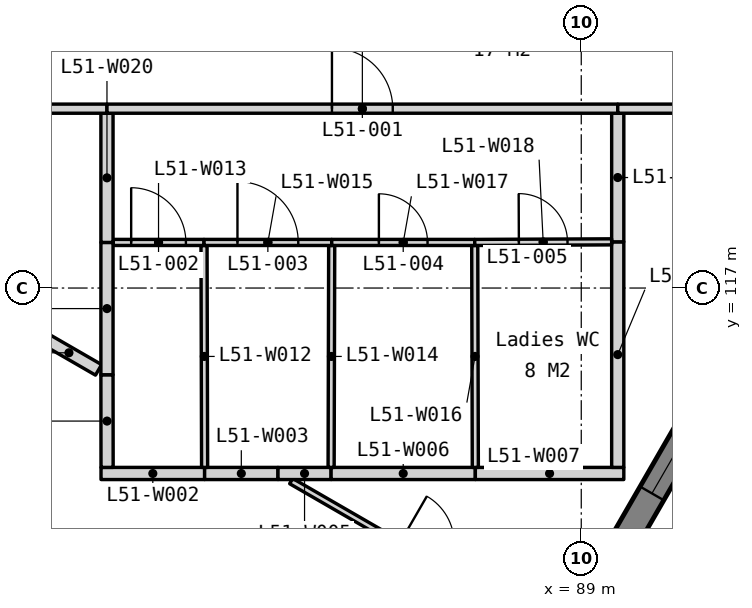
"""IFC4 building model, lengths in metres.
Left out: names, types, materials, properties, quantities, classifications, styles, units other than length and angle.
Written with IfcOpenShell. Run it as: python <this file> out.ifc"""

import sys

from ifc_helpers import new_model, si_unit, direction, frame, frame_2d, origin, place, context, subcontext, project, spatial, polyline, rectangle, outline, extrude, element, fill, save


model = new_model("IFC4")
c1 = context("Model", 3, precision=1e-05, world=origin(), true_north=direction((0.0, 1.0)))
c2 = subcontext(c1, "Body", "Model", "MODEL_VIEW")
j1 = project(units=[si_unit("LENGTHUNIT", "METRE"), si_unit("PLANEANGLEUNIT", "RADIAN")], contexts=[c1])
p1 = place(None, origin())
s1 = spatial("IfcSite", under=j1, at=p1, CompositionType="ELEMENT")
p2 = place(p1, origin())
s2 = spatial("IfcBuilding", under=s1, at=p2, CompositionType="ELEMENT")
p3 = place(p2, frame((0.0, 0.0, 203.6)))
s3 = spatial("IfcBuildingStorey", under=s2, at=p3, CompositionType="ELEMENT", Elevation=203.6)
p4 = place(p3, frame((81.505, 98.627, -0.15), z_axis=(0.0, 0.0, 1.0), x_axis=(0.500002199942, 0.866024133644, 0.0)))
e1 = element("IfcWall", 1, at=p4, inside=s3, PredefinedType="SOLIDWALL", context=c2, shape_type="SweptSolid", body=[
    extrude(outline(polyline([(38.729, 0.0), (38.729, 3.9), (0.0, 3.9), (0.0, 0.0), (38.729, 0.0)])), frame((0.0, 0.225, 0.0), z_axis=(0.0, -1.0, 0.0), x_axis=(1.0, 0.0, 0.0)), (0.0, 0.0, 1.0), 0.45),
])
p5 = place(p4, frame((0.807, 0.0, 0.95)))
e2 = element("IfcOpeningElement", 2, at=p5, cuts=e1, PredefinedType="OPENING", context=c2, shape_type="SweptSolid", body=[
    extrude(rectangle(XDim=1.2, YDim=2.2, at=frame_2d((0.6, 1.1))), frame((0.0, 0.235, 0.0), z_axis=(0.0, -1.0, 0.0), x_axis=(1.0, 0.0, 0.0)), (0.0, 0.0, 1.0), 0.47),
])
p6 = place(p4, frame((7.632, 0.0, 0.95)))
e3 = element("IfcOpeningElement", 3, at=p6, cuts=e1, PredefinedType="OPENING", context=c2, shape_type="SweptSolid", body=[
    extrude(rectangle(XDim=1.8, YDim=2.2, at=frame_2d((0.9, 1.1))), frame((0.0, 0.235, 0.0), z_axis=(0.0, -1.0, 0.0), x_axis=(1.0, 0.0, 0.0)), (0.0, 0.0, 1.0), 0.47),
])
p7 = place(p4, frame((9.932, 0.0, 0.95)))
e4 = element("IfcOpeningElement", 4, at=p7, cuts=e1, PredefinedType="OPENING", context=c2, shape_type="SweptSolid", body=[
    extrude(rectangle(XDim=1.8, YDim=2.2, at=frame_2d((0.9, 1.1))), frame((0.0, 0.235, 0.0), z_axis=(0.0, -1.0, 0.0), x_axis=(1.0, 0.0, 0.0)), (0.0, 0.0, 1.0), 0.47),
])
p8 = place(p4, frame((17.315, 0.0, 0.95)))
e5 = element("IfcOpeningElement", 5, at=p8, cuts=e1, PredefinedType="OPENING", context=c2, shape_type="SweptSolid", body=[
    extrude(rectangle(XDim=1.8, YDim=2.2, at=frame_2d((0.9, 1.1))), frame((0.0, 0.235, 0.0), z_axis=(0.0, -1.0, 0.0), x_axis=(1.0, 0.0, 0.0)), (0.0, 0.0, 1.0), 0.47),
])
p9 = place(p4, frame((19.615, 0.0, 0.95)))
e6 = element("IfcOpeningElement", 6, at=p9, cuts=e1, PredefinedType="OPENING", context=c2, shape_type="SweptSolid", body=[
    extrude(rectangle(XDim=1.8, YDim=2.2, at=frame_2d((0.9, 1.1))), frame((0.0, 0.235, 0.0), z_axis=(0.0, -1.0, 0.0), x_axis=(1.0, 0.0, 0.0)), (0.0, 0.0, 1.0), 0.47),
])
p10 = place(p4, frame((26.997, 0.0, 0.95)))
e7 = element("IfcOpeningElement", 7, at=p10, cuts=e1, PredefinedType="OPENING", context=c2, shape_type="SweptSolid", body=[
    extrude(rectangle(XDim=1.8, YDim=2.2, at=frame_2d((0.9, 1.1))), frame((0.0, 0.235, 0.0), z_axis=(0.0, -1.0, 0.0), x_axis=(1.0, 0.0, 0.0)), (0.0, 0.0, 1.0), 0.47),
])
p11 = place(p4, frame((29.297, 0.0, 0.95)))
e8 = element("IfcOpeningElement", 8, at=p11, cuts=e1, PredefinedType="OPENING", context=c2, shape_type="SweptSolid", body=[
    extrude(rectangle(XDim=1.8, YDim=2.2, at=frame_2d((0.9, 1.1))), frame((0.0, 0.235, 0.0), z_axis=(0.0, -1.0, 0.0), x_axis=(1.0, 0.0, 0.0)), (0.0, 0.0, 1.0), 0.47),
])
p12 = place(p4, frame((36.722, 0.0, 0.95)))
e9 = element("IfcOpeningElement", 9, at=p12, cuts=e1, PredefinedType="OPENING", context=c2, shape_type="SweptSolid", body=[
    extrude(rectangle(XDim=1.2, YDim=2.2, at=frame_2d((0.6, 1.1))), frame((0.0, 0.235, 0.0), z_axis=(0.0, -1.0, 0.0), x_axis=(1.0, 0.0, 0.0)), (0.0, 0.0, 1.0), 0.47),
])
p13 = place(p3, frame((81.102, 113.95, 0.0), z_axis=(0.0, 0.0, 1.0), x_axis=(1.0, 0.0, 0.0)))
e10 = element("IfcWall", 10, at=p13, inside=s3, PredefinedType="PARTITIONING", context=c2, shape_type="SweptSolid", body=[
    extrude(rectangle(XDim=1.704, YDim=0.2, at=frame_2d((0.852, 0.0))), origin(), (0.0, 0.0, 1.0), 3.75),
])
p14 = place(p3, frame((82.806, 113.95, 0.0), z_axis=(0.0, 0.0, 1.0), x_axis=(1.0, 0.0, 0.0)))
e11 = element("IfcWall", 11, at=p14, inside=s3, PredefinedType="PARTITIONING", context=c2, shape_type="SweptSolid", body=[
    extrude(rectangle(XDim=1.207, YDim=0.2, at=frame_2d((0.604, 0.0))), origin(), (0.0, 0.0, 1.0), 3.75),
])
p15 = place(p3, frame((84.229, 113.825, 0.0), z_axis=(0.0, 0.0, 1.0), x_axis=(0.866023434512, -0.500003410864, 0.0)))
e12 = element("IfcWall", 12, at=p15, inside=s3, PredefinedType="PARTITIONING", context=c2, shape_type="SweptSolid", body=[
    extrude(rectangle(XDim=5.015, YDim=0.1, at=frame_2d((2.507, 0.0))), origin(), (0.0, 0.0, 1.0), 3.75),
])
p16 = place(p15, frame((2.057, 0.0, 0.0)))
e13 = element("IfcOpeningElement", 13, at=p16, cuts=e12, PredefinedType="OPENING", context=c2, shape_type="SweptSolid", body=[
    extrude(rectangle(XDim=0.9, YDim=2.1, at=frame_2d((0.45, 1.05))), frame((0.0, 0.06, 0.0), z_axis=(0.0, -1.0, 0.0), x_axis=(1.0, 0.0, 0.0)), (0.0, 0.0, 1.0), 0.12),
])
p17 = place(p3, frame((84.013, 113.95, 0.0), z_axis=(0.0, 0.0, 1.0), x_axis=(1.0, 0.0, 0.0)))
e14 = element("IfcWall", 14, at=p17, inside=s3, PredefinedType="PARTITIONING", context=c2, shape_type="SweptSolid", body=[
    extrude(rectangle(XDim=0.873, YDim=0.2, at=frame_2d((0.437, 0.0))), origin(), (0.0, 0.0, 1.0), 3.75),
])
p18 = place(p3, frame((84.886, 113.95, 0.0), z_axis=(0.0, 0.0, 1.0), x_axis=(1.0, 0.0, 0.0)))
e15 = element("IfcWall", 15, at=p18, inside=s3, PredefinedType="PARTITIONING", context=c2, shape_type="SweptSolid", body=[
    extrude(rectangle(XDim=2.372, YDim=0.2, at=frame_2d((1.186, 0.0))), origin(), (0.0, 0.0, 1.0), 3.75),
])
p19 = place(p3, frame((87.258, 113.95, 0.0), z_axis=(0.0, 0.0, 1.0), x_axis=(1.0, 0.0, 0.0)))
e16 = element("IfcWall", 16, at=p19, inside=s3, PredefinedType="PARTITIONING", context=c2, shape_type="SweptSolid", body=[
    extrude(rectangle(XDim=2.442, YDim=0.2, at=frame_2d((1.221, 0.0))), origin(), (0.0, 0.0, 1.0), 3.75),
])
p20 = place(p3, frame((89.6, 114.05, 0.0), z_axis=(0.0, 0.0, 1.0), x_axis=(0.0, 1.0, 0.0)))
e17 = element("IfcWall", 17, at=p20, inside=s3, PredefinedType="PARTITIONING", context=c2, shape_type="SweptSolid", body=[
    extrude(rectangle(XDim=3.71, YDim=0.2, at=frame_2d((1.855, 0.0))), origin(), (0.0, 0.0, 1.0), 3.75),
])
p21 = place(p3, frame((81.202, 114.05, 0.0), z_axis=(0.0, 0.0, 1.0), x_axis=(-0.001281639447, 0.9999991787, 0.0)))
e18 = element("IfcWall", 18, at=p21, inside=s3, PredefinedType="PARTITIONING", context=c2, shape_type="SweptSolid", body=[
    extrude(rectangle(XDim=1.524, YDim=0.2, at=frame_2d((0.762, 0.0))), origin(), (0.0, 0.0, 1.0), 3.75),
])
p22 = place(p3, frame((80.088, 116.216, 0.0), z_axis=(0.0, 0.0, 1.0), x_axis=(0.866030125237, -0.499991822116, 0.0)))
e19 = element("IfcWall", 19, at=p22, inside=s3, PredefinedType="PARTITIONING", context=c2, shape_type="SweptSolid", body=[
    extrude(rectangle(XDim=1.125, YDim=0.2, at=frame_2d((0.562, 0.0))), origin(), (0.0, 0.0, 1.0), 3.75),
])
p23 = place(p3, frame((89.6, 117.76, 0.0), z_axis=(0.0, 0.0, 1.0), x_axis=(0.0, 1.0, 0.0)))
e20 = element("IfcWall", 20, at=p23, inside=s3, PredefinedType="PARTITIONING", context=c2, shape_type="SweptSolid", body=[
    extrude(rectangle(XDim=2.115, YDim=0.2, at=frame_2d((1.058, 0.0))), origin(), (0.0, 0.0, 1.0), 3.75),
])
p24 = place(p3, frame((82.806, 114.05, 0.0), z_axis=(0.0, 0.0, 1.0), x_axis=(-0.002608686776, 0.999996597371, 0.0)))
e21 = element("IfcWall", 21, at=p24, inside=s3, PredefinedType="PARTITIONING", context=c2, shape_type="SweptSolid", body=[
    extrude(rectangle(XDim=3.65, YDim=0.1, at=frame_2d((1.825, 0.0))), origin(), (0.0, 0.0, 1.0), 3.75),
])
p25 = place(p3, frame((81.3, 117.75, 0.0), z_axis=(0.0, 0.0, 1.0), x_axis=(1.0, 0.0, 0.0)))
e22 = element("IfcWall", 22, at=p25, inside=s3, PredefinedType="PARTITIONING", context=c2, shape_type="SweptSolid", body=[
    extrude(rectangle(XDim=1.496, YDim=0.1, at=frame_2d((0.748, 0.0))), origin(), (0.0, 0.0, 1.0), 3.75),
])
p26 = place(p25, frame((0.298, 0.0, 0.0)))
e23 = element("IfcOpeningElement", 23, at=p26, cuts=e22, PredefinedType="OPENING", context=c2, shape_type="SweptSolid", body=[
    extrude(rectangle(XDim=0.9, YDim=2.1, at=frame_2d((0.45, 1.05))), frame((0.0, 0.06, 0.0), z_axis=(0.0, -1.0, 0.0), x_axis=(1.0, 0.0, 0.0)), (0.0, 0.0, 1.0), 0.12),
])
p27 = place(p3, frame((84.886, 114.05, 0.0), z_axis=(0.0, 0.0, 1.0), x_axis=(0.002608686776, 0.999996597371, 0.0)))
e24 = element("IfcWall", 24, at=p27, inside=s3, PredefinedType="PARTITIONING", context=c2, shape_type="SweptSolid", body=[
    extrude(rectangle(XDim=3.65, YDim=0.1, at=frame_2d((1.825, 0.0))), origin(), (0.0, 0.0, 1.0), 3.75),
])
p28 = place(p3, frame((82.796, 117.75, 0.0), z_axis=(0.0, 0.0, 1.0), x_axis=(1.0, 0.0, 0.0)))
e25 = element("IfcWall", 25, at=p28, inside=s3, PredefinedType="PARTITIONING", context=c2, shape_type="SweptSolid", body=[
    extrude(rectangle(XDim=2.1, YDim=0.1, at=frame_2d((1.05, 0.0))), origin(), (0.0, 0.0, 1.0), 3.75),
])
p29 = place(p28, frame((0.55, 0.0, 0.0)))
e26 = element("IfcOpeningElement", 26, at=p29, cuts=e25, PredefinedType="OPENING", context=c2, shape_type="SweptSolid", body=[
    extrude(rectangle(XDim=1.0, YDim=2.1, at=frame_2d((0.5, 1.05))), frame((0.0, 0.06, 0.0), z_axis=(0.0, -1.0, 0.0), x_axis=(1.0, 0.0, 0.0)), (0.0, 0.0, 1.0), 0.12),
])
p30 = place(p3, frame((87.258, 114.05, 0.0), z_axis=(0.0, 0.0, 1.0), x_axis=(-0.002675575707, 0.999996420641, 0.0)))
e27 = element("IfcWall", 27, at=p30, inside=s3, PredefinedType="PARTITIONING", context=c2, shape_type="SweptSolid", body=[
    extrude(rectangle(XDim=3.65, YDim=0.1, at=frame_2d((1.825, 0.0))), origin(), (0.0, 0.0, 1.0), 3.75),
])
p31 = place(p3, frame((84.896, 117.75, 0.0), z_axis=(0.0, 0.0, 1.0), x_axis=(1.0, 0.0, 0.0)))
e28 = element("IfcWall", 28, at=p31, inside=s3, PredefinedType="PARTITIONING", context=c2, shape_type="SweptSolid", body=[
    extrude(rectangle(XDim=2.352, YDim=0.1, at=frame_2d((1.176, 0.0))), origin(), (0.0, 0.0, 1.0), 3.75),
])
p32 = place(p31, frame((0.776, 0.0, 0.0)))
e29 = element("IfcOpeningElement", 29, at=p32, cuts=e28, PredefinedType="OPENING", context=c2, shape_type="SweptSolid", body=[
    extrude(rectangle(XDim=0.8, YDim=2.1, at=frame_2d((0.4, 1.05))), frame((0.0, 0.06, 0.0), z_axis=(0.0, -1.0, 0.0), x_axis=(1.0, 0.0, 0.0)), (0.0, 0.0, 1.0), 0.12),
])
p33 = place(p3, frame((87.248, 117.75, 0.0), z_axis=(0.0, 0.0, 1.0), x_axis=(0.999991061702, 0.004228062815, 0.0)))
e30 = element("IfcWall", 30, at=p33, inside=s3, PredefinedType="PARTITIONING", context=c2, shape_type="SweptSolid", body=[
    extrude(rectangle(XDim=2.252, YDim=0.1, at=frame_2d((1.126, 0.0))), origin(), (0.0, 0.0, 1.0), 3.75),
])
p34 = place(p33, frame((0.726, 0.0, 0.0)))
e31 = element("IfcOpeningElement", 31, at=p34, cuts=e30, PredefinedType="OPENING", context=c2, shape_type="SweptSolid", body=[
    extrude(rectangle(XDim=0.8, YDim=2.1, at=frame_2d((0.4, 1.05))), frame((0.0, 0.06, 0.0), z_axis=(0.0, -1.0, 0.0), x_axis=(1.0, 0.0, 0.0)), (0.0, 0.0, 1.0), 0.12),
])
p35 = place(p3, frame((81.2, 115.574, 0.0), z_axis=(0.0, 0.0, 1.0), x_axis=(0.0, 1.0, 0.0)))
e32 = element("IfcWall", 32, at=p35, inside=s3, PredefinedType="PARTITIONING", context=c2, shape_type="SweptSolid", body=[
    extrude(rectangle(XDim=2.176, YDim=0.2, at=frame_2d((1.088, 0.0))), origin(), (0.0, 0.0, 1.0), 3.75),
])
p36 = place(p3, frame((81.2, 117.75, 0.0), z_axis=(0.0, 0.0, 1.0), x_axis=(0.0, 1.0, 0.0)))
e33 = element("IfcWall", 33, at=p36, inside=s3, PredefinedType="PARTITIONING", context=c2, shape_type="SweptSolid", body=[
    extrude(rectangle(XDim=2.125, YDim=0.2, at=frame_2d((1.062, 0.0))), origin(), (0.0, 0.0, 1.0), 3.75),
])
p37 = place(p3, frame((66.925, 119.95, 0.0), z_axis=(0.0, 0.0, 1.0), x_axis=(1.0, 0.0, 0.0)))
e34 = element("IfcWall", 34, at=p37, inside=s3, PredefinedType="PARTITIONING", context=c2, shape_type="SweptSolid", body=[
    extrude(rectangle(XDim=14.275, YDim=0.15, at=frame_2d((7.137, 0.0))), origin(), (0.0, 0.0, 1.0), 3.75),
])
p38 = place(p37, frame((6.637, 0.0, 0.0)))
e35 = element("IfcOpeningElement", 35, at=p38, cuts=e34, PredefinedType="OPENING", context=c2, shape_type="SweptSolid", body=[
    extrude(rectangle(XDim=1.0, YDim=2.1, at=frame_2d((0.5, 1.05))), frame((0.0, 0.085, 0.0), z_axis=(0.0, -1.0, 0.0), x_axis=(1.0, 0.0, 0.0)), (0.0, 0.0, 1.0), 0.17),
])
p39 = place(p3, frame((81.2, 119.95, 0.0), z_axis=(0.0, 0.0, 1.0), x_axis=(1.0, 0.0, 0.0)))
e36 = element("IfcWall", 36, at=p39, inside=s3, PredefinedType="PARTITIONING", context=c2, shape_type="SweptSolid", body=[
    extrude(rectangle(XDim=8.4, YDim=0.15, at=frame_2d((4.2, 0.0))), origin(), (0.0, 0.0, 1.0), 3.75),
])
p40 = place(p39, frame((3.7, 0.0, 0.0)))
e37 = element("IfcOpeningElement", 37, at=p40, cuts=e36, PredefinedType="OPENING", context=c2, shape_type="SweptSolid", body=[
    extrude(rectangle(XDim=1.0, YDim=2.1, at=frame_2d((0.5, 1.05))), frame((0.0, 0.085, 0.0), z_axis=(0.0, -1.0, 0.0), x_axis=(1.0, 0.0, 0.0)), (0.0, 0.0, 1.0), 0.17),
])
p41 = place(p3, frame((89.6, 119.95, 0.0), z_axis=(0.0, 0.0, 1.0), x_axis=(1.0, 0.0, 0.0)))
e38 = element("IfcWall", 38, at=p41, inside=s3, PredefinedType="PARTITIONING", context=c2, shape_type="SweptSolid", body=[
    extrude(rectangle(XDim=3.475, YDim=0.15, at=frame_2d((1.737, 0.0))), origin(), (0.0, 0.0, 1.0), 3.75),
])
p42 = place(p8, origin())
e39 = element("IfcWindow", 39, at=p42, inside=s3, PartitioningType="SINGLE_PANEL", PredefinedType="WINDOW", context=c2, shape_type="SweptSolid", body=[
    extrude(rectangle(XDim=1.8, YDim=2.2, at=frame_2d((0.9, 1.1))), frame((0.0, 0.03, 0.0), z_axis=(0.0, -1.0, 0.0), x_axis=(1.0, 0.0, 0.0)), (0.0, 0.0, 1.0), 0.06),
])
fill(e5, e39)
p43 = place(p40, origin())
e40 = element("IfcDoor", 40, at=p43, inside=s3, OperationType="SINGLE_SWING_LEFT", PredefinedType="DOOR", context=c2, shape_type="SweptSolid", body=[
    extrude(rectangle(XDim=1.0, YDim=2.1, at=frame_2d((0.5, 1.05))), frame((0.0, 0.025, 0.0), z_axis=(0.0, -1.0, 0.0), x_axis=(1.0, 0.0, 0.0)), (0.0, 0.0, 1.0), 0.05),
])
fill(e37, e40)
p44 = place(p26, origin())
e41 = element("IfcDoor", 41, at=p44, inside=s3, OperationType="SINGLE_SWING_LEFT", PredefinedType="DOOR", context=c2, shape_type="SweptSolid", body=[
    extrude(rectangle(XDim=0.9, YDim=2.1, at=frame_2d((0.45, 1.05))), frame((0.0, 0.025, 0.0), z_axis=(0.0, -1.0, 0.0), x_axis=(1.0, 0.0, 0.0)), (0.0, 0.0, 1.0), 0.05),
])
fill(e23, e41)
p45 = place(p29, origin())
e42 = element("IfcDoor", 42, at=p45, inside=s3, OperationType="SINGLE_SWING_LEFT", PredefinedType="DOOR", context=c2, shape_type="SweptSolid", body=[
    extrude(rectangle(XDim=1.0, YDim=2.1, at=frame_2d((0.5, 1.05))), frame((0.0, 0.025, 0.0), z_axis=(0.0, -1.0, 0.0), x_axis=(1.0, 0.0, 0.0)), (0.0, 0.0, 1.0), 0.05),
])
fill(e26, e42)
p46 = place(p32, origin())
e43 = element("IfcDoor", 43, at=p46, inside=s3, OperationType="SINGLE_SWING_LEFT", PredefinedType="DOOR", context=c2, shape_type="SweptSolid", body=[
    extrude(rectangle(XDim=0.8, YDim=2.1, at=frame_2d((0.4, 1.05))), frame((0.0, 0.025, 0.0), z_axis=(0.0, -1.0, 0.0), x_axis=(1.0, 0.0, 0.0)), (0.0, 0.0, 1.0), 0.05),
])
fill(e29, e43)
p47 = place(p34, origin())
e44 = element("IfcDoor", 44, at=p47, inside=s3, OperationType="SINGLE_SWING_LEFT", PredefinedType="DOOR", context=c2, shape_type="SweptSolid", body=[
    extrude(rectangle(XDim=0.8, YDim=2.1, at=frame_2d((0.4, 1.05))), frame((0.0, 0.025, 0.0), z_axis=(0.0, -1.0, 0.0), x_axis=(1.0, 0.0, 0.0)), (0.0, 0.0, 1.0), 0.05),
])
fill(e31, e44)
save(model, sys.argv[1])
